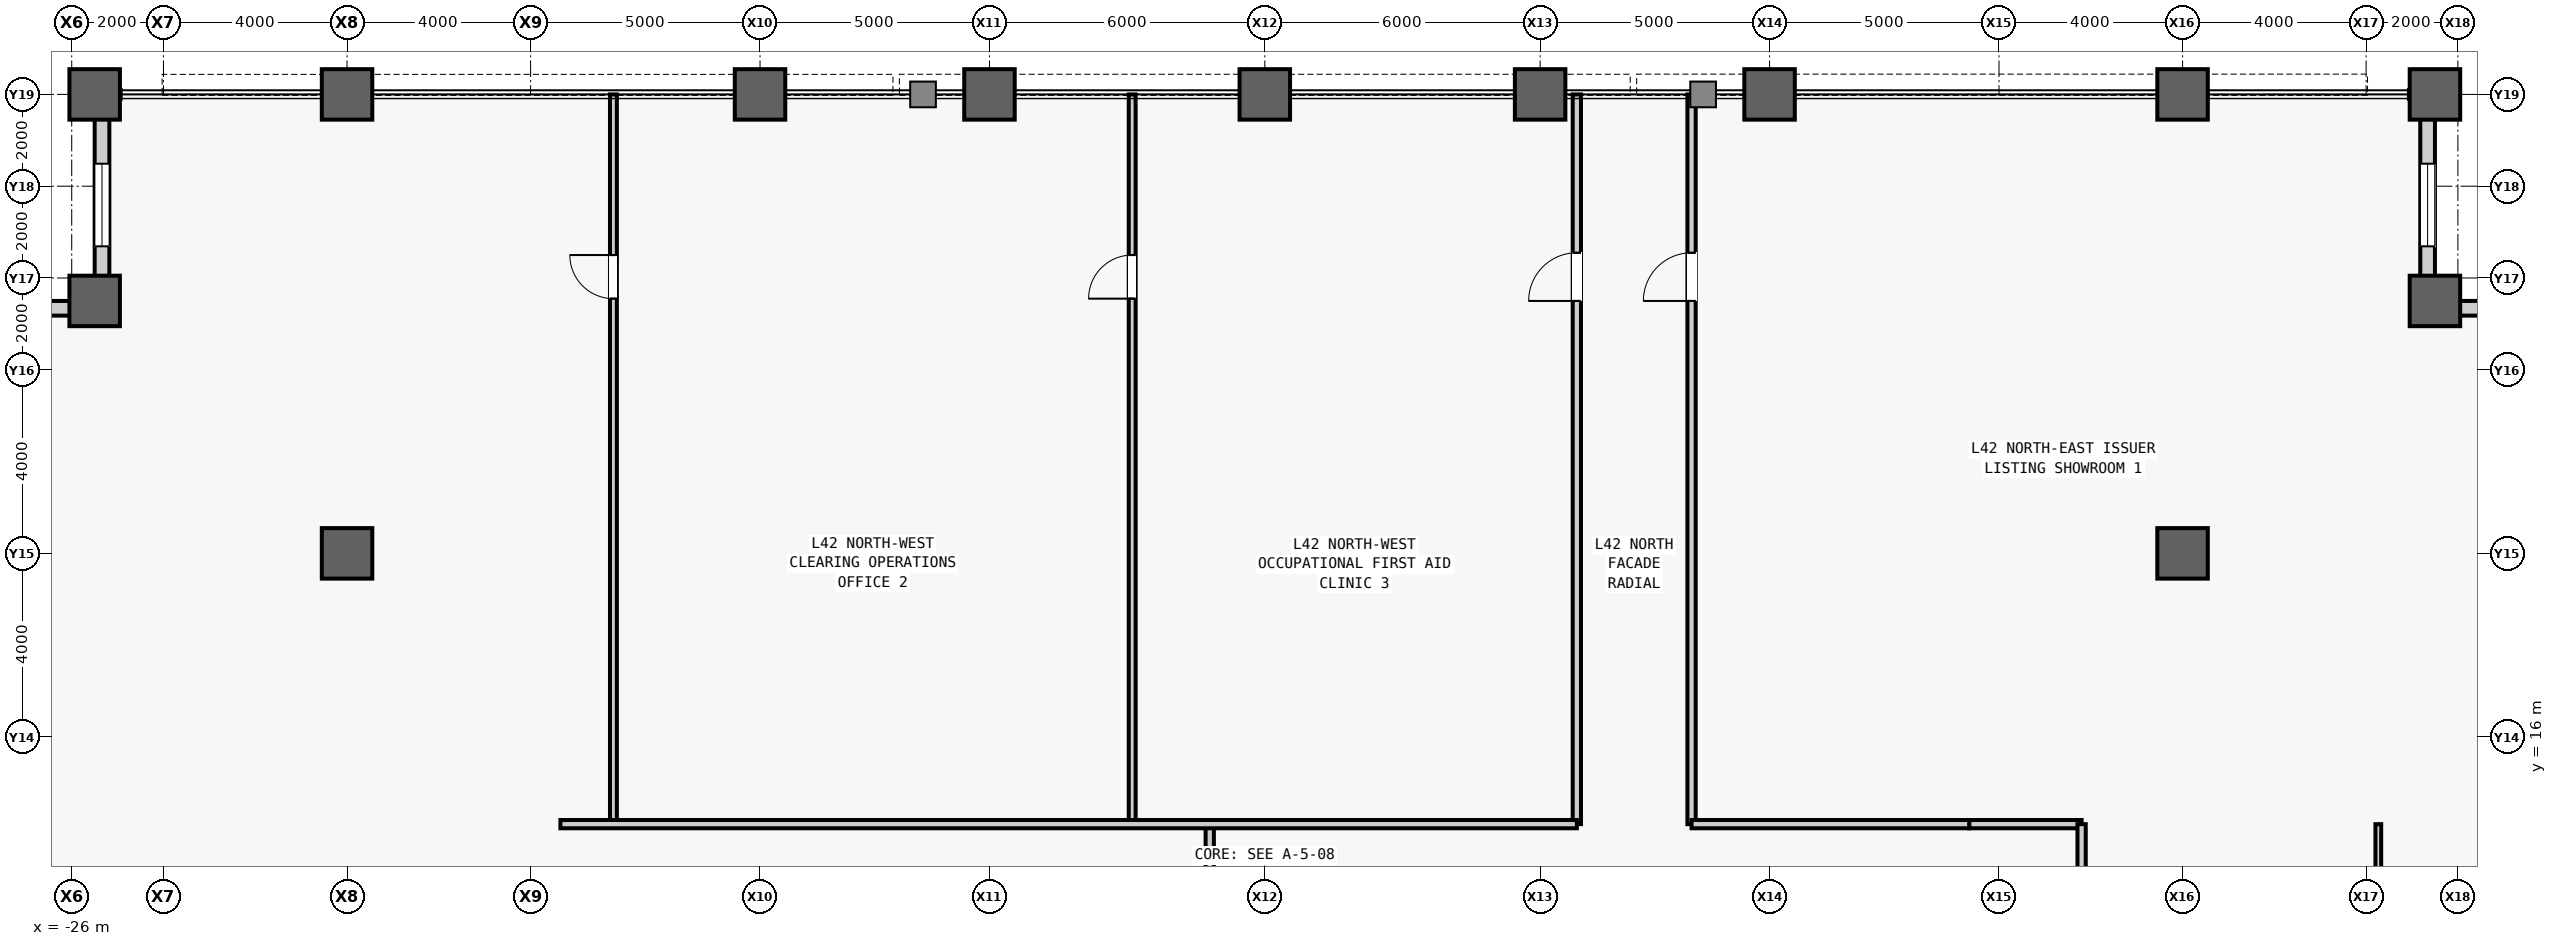
"""IFC4 building model, lengths in metres.
Left out: names, types, materials, properties, quantities, classifications, styles, units other than length and angle.
Written with IfcOpenShell. Run it as: python <this file> out.ifc"""

import sys

from ifc_helpers import new_model, si_unit, direction, frame, frame_2d, origin, origin_2d, place, context, subcontext, project, spatial, rectangle, hollow_rectangle, extrude, source, transform, mapped, element, fill, save


model = new_model("IFC4")
c1 = context("Model", 3, precision=1e-05, world=origin(), true_north=direction((0.0, 1.0)))
c2 = subcontext(c1, "Body", "Model", "MODEL_VIEW")
j1 = project(units=[si_unit("LENGTHUNIT", "METRE"), si_unit("PLANEANGLEUNIT", "RADIAN")], contexts=[c1])
p1 = place(None, origin())
s1 = spatial("IfcSite", under=j1, at=p1, CompositionType="ELEMENT")
p2 = place(p1, origin())
s2 = spatial("IfcBuilding", under=s1, at=p2, CompositionType="ELEMENT")
p3 = place(p2, frame((0.0, 0.0, 183.1)))
s3 = spatial("IfcBuildingStorey", under=s2, at=p3, CompositionType="ELEMENT", Elevation=183.1)
m1 = source(origin(), c2, "Body", "SweptSolid", [
    extrude(hollow_rectangle(XDim=1.1, YDim=1.1, WallThickness=0.06, at=origin_2d()), origin(), (0.0, 0.0, 1.0), 4.0),
])
for number, where, z_axis, x_axis in (
    (1, (-25.5, 25.5, 0.0), (0.0, 0.0, 1.0), (1.0, 0.0, 0.0)),
    (2, (-25.5, 30.0, 0.0), (0.0, 0.0, 1.0), (1.0, 0.0, 0.0)),
    (3, (-20.0, 20.0, 0.0), (0.0, 0.0, 1.0), (1.0, 0.0, 0.0)),
    (4, (-20.0, 30.0, 0.0), (0.0, 0.0, 1.0), (1.0, 0.0, 0.0)),
    (5, (-11.0, 30.0, 0.0), (0.0, 0.0, 1.0), (1.0, 0.0, 0.0)),
    (6, (-6.0, 30.0, 0.0), (0.0, 0.0, 1.0), (1.0, 0.0, 0.0)),
    (7, (0.0, 30.0, 0.0), (0.0, 0.0, 1.0), (1.0, 0.0, 0.0)),
    (8, (6.0, 30.0, 0.0), (0.0, 0.0, 1.0), (1.0, 0.0, 0.0)),
    (9, (11.0, 30.0, 0.0), (0.0, 0.0, 1.0), (1.0, 0.0, 0.0)),
    (10, (20.0, 20.0, 0.0), (0.0, 0.0, 1.0), (1.0, 0.0, 0.0)),
    (11, (20.0, 30.0, 0.0), (0.0, 0.0, 1.0), (1.0, 0.0, 0.0)),
    (12, (25.5, 25.5, 0.0), (0.0, 0.0, 1.0), (1.0, 0.0, 0.0)),
    (13, (25.5, 30.0, 0.0), (0.0, 0.0, 1.0), (1.0, 0.0, 0.0)),
):
    element("IfcColumn", number, at=place(p3, frame(where, z_axis=z_axis, x_axis=x_axis)), inside=s3, PredefinedType="COLUMN", context=c2, shape_type="MappedRepresentation", body=[
        mapped(m1, transform((0.0, 0.0, 0.0), scale=1.0)),
    ])
m2 = source(origin(), c2, "Body", "SweptSolid", [
    extrude(rectangle(XDim=4.18, YDim=0.32, at=frame_2d((2.09, 0.0))), origin(), (0.0, 0.0, 1.0), 3.164),
])
p4 = place(p3, frame((25.5, 25.34, 0.0), z_axis=(0.0, 0.0, 1.0), x_axis=(1.0, 0.0, 0.0)))
e14 = element("IfcWall", 14, at=p4, inside=s3, PredefinedType="STANDARD", context=c2, shape_type="MappedRepresentation", body=[
    mapped(m2, transform((0.0, 0.0, 0.0), scale=1.0)),
])
m3 = source(origin(), c2, "Body", "SweptSolid", [
    extrude(rectangle(XDim=1.8, YDim=2.4, at=frame_2d((0.9, 1.2))), frame((0.0, 0.17, 0.0), z_axis=(0.0, -1.0, 0.0), x_axis=(1.0, 0.0, 0.0)), (0.0, 0.0, 1.0), 0.34),
])
p5 = place(p4, frame((1.19, 0.0, 0.5)))
e15 = element("IfcOpeningElement", 15, at=p5, cuts=e14, PredefinedType="OPENING", context=c2, shape_type="MappedRepresentation", body=[
    mapped(m3, transform((0.0, 0.0, 0.0), scale=1.0)),
])
p6 = place(p3, frame((25.34, 25.5, 0.0), z_axis=(0.0, 0.0, 1.0), x_axis=(0.0, 1.0, 0.0)))
e16 = element("IfcWall", 16, at=p6, inside=s3, PredefinedType="STANDARD", context=c2, shape_type="MappedRepresentation", body=[
    mapped(m2, transform((0.0, 0.0, 0.0), scale=1.0)),
])
p7 = place(p6, frame((1.19, 0.0, 0.5)))
e17 = element("IfcOpeningElement", 17, at=p7, cuts=e16, PredefinedType="OPENING", context=c2, shape_type="MappedRepresentation", body=[
    mapped(m3, transform((0.0, 0.0, 0.0), scale=1.0)),
])
p8 = place(p3, frame((-25.34, 25.5, 0.0), z_axis=(0.0, 0.0, 1.0), x_axis=(0.0, 1.0, 0.0)))
e18 = element("IfcWall", 18, at=p8, inside=s3, PredefinedType="STANDARD", context=c2, shape_type="MappedRepresentation", body=[
    mapped(m2, transform((0.0, 0.0, 0.0), scale=1.0)),
])
p9 = place(p8, frame((1.19, 0.0, 0.5)))
e19 = element("IfcOpeningElement", 19, at=p9, cuts=e18, PredefinedType="OPENING", context=c2, shape_type="MappedRepresentation", body=[
    mapped(m3, transform((0.0, 0.0, 0.0), scale=1.0)),
])
p10 = place(p3, frame((-25.5, 25.34, 0.0), z_axis=(0.0, 0.0, 1.0), x_axis=(-1.0, 0.0, 0.0)))
e20 = element("IfcWall", 20, at=p10, inside=s3, PredefinedType="STANDARD", context=c2, shape_type="MappedRepresentation", body=[
    mapped(m2, transform((0.0, 0.0, 0.0), scale=1.0)),
])
p11 = place(p10, frame((1.19, 0.0, 0.5)))
e21 = element("IfcOpeningElement", 21, at=p11, cuts=e20, PredefinedType="OPENING", context=c2, shape_type="MappedRepresentation", body=[
    mapped(m3, transform((0.0, 0.0, 0.0), scale=1.0)),
])
m4 = source(origin(), c2, "Body", "SweptSolid", [
    extrude(rectangle(XDim=2.45, YDim=0.18, at=frame_2d((1.225, 0.0))), origin(), (0.0, 0.0, 1.0), 3.78),
])
p12 = place(p3, frame((15.35, 14.1, 0.0), z_axis=(0.0, 0.0, 1.0), x_axis=(1.0, 0.0, 0.0)))
e22 = element("IfcWall", 22, at=p12, inside=s3, PredefinedType="PARTITIONING", context=c2, shape_type="MappedRepresentation", body=[
    mapped(m4, transform((0.0, 0.0, 0.0), scale=1.0)),
])
m5 = source(origin(), c2, "Body", "SweptSolid", [
    extrude(rectangle(XDim=3.1, YDim=0.18, at=frame_2d((1.55, 0.0))), origin(), (0.0, 0.0, 1.0), 3.78),
])
p13 = place(p3, frame((-1.2, 11.0, 0.0), z_axis=(0.0, 0.0, 1.0), x_axis=(0.0, 1.0, 0.0)))
e23 = element("IfcWall", 23, at=p13, inside=s3, PredefinedType="PARTITIONING", context=c2, shape_type="MappedRepresentation", body=[
    mapped(m5, transform((0.0, 0.0, 0.0), scale=1.0)),
])
m6 = source(origin(), c2, "Body", "SweptSolid", [
    extrude(rectangle(XDim=15.9, YDim=0.15, at=frame_2d((7.95, 0.0))), origin(), (0.0, 0.0, 1.0), 3.78),
])
p14 = place(p3, frame((-14.195, 14.1, 0.0), z_axis=(0.0, 0.0, 1.0), x_axis=(0.0, 1.0, 0.0)))
e24 = element("IfcWall", 24, at=p14, inside=s3, PredefinedType="PARTITIONING", context=c2, shape_type="MappedRepresentation", body=[
    mapped(m6, transform((0.0, 0.0, 0.0), scale=1.0)),
])
m7 = source(origin(), c2, "Body", "SweptSolid", [
    extrude(rectangle(XDim=0.95, YDim=2.15, at=frame_2d((0.475, 1.075))), frame((0.0, 0.085, 0.0), z_axis=(0.0, -1.0, 0.0), x_axis=(1.0, 0.0, 0.0)), (0.0, 0.0, 1.0), 0.17),
])
p15 = place(p14, frame((11.45, 0.0, 0.0)))
e25 = element("IfcOpeningElement", 25, at=p15, cuts=e24, PredefinedType="OPENING", context=c2, shape_type="MappedRepresentation", body=[
    mapped(m7, transform((0.0, 0.0, 0.0), scale=1.0)),
])
p16 = place(p3, frame((-2.89, 14.1, 0.0), z_axis=(0.0, 0.0, 1.0), x_axis=(0.0, 1.0, 0.0)))
e26 = element("IfcWall", 26, at=p16, inside=s3, PredefinedType="PARTITIONING", context=c2, shape_type="MappedRepresentation", body=[
    mapped(m6, transform((0.0, 0.0, 0.0), scale=1.0)),
])
p17 = place(p16, frame((11.45, 0.0, 0.0)))
e27 = element("IfcOpeningElement", 27, at=p17, cuts=e26, PredefinedType="OPENING", context=c2, shape_type="MappedRepresentation", body=[
    mapped(m7, transform((0.0, 0.0, 0.0), scale=1.0)),
])
m8 = source(origin(), c2, "Body", "SweptSolid", [
    extrude(rectangle(XDim=15.9, YDim=0.18, at=frame_2d((7.95, 0.0))), origin(), (0.0, 0.0, 1.0), 3.78),
])
p18 = place(p3, frame((6.8, 14.1, 0.0), z_axis=(0.0, 0.0, 1.0), x_axis=(0.0, 1.0, 0.0)))
e28 = element("IfcWall", 28, at=p18, inside=s3, PredefinedType="PARTITIONING", context=c2, shape_type="MappedRepresentation", body=[
    mapped(m8, transform((0.0, 0.0, 0.0), scale=1.0)),
])
m9 = source(origin(), c2, "Body", "SweptSolid", [
    extrude(rectangle(XDim=1.05, YDim=2.2, at=frame_2d((0.525, 1.1))), frame((0.0, 0.1, 0.0), z_axis=(0.0, -1.0, 0.0), x_axis=(1.0, 0.0, 0.0)), (0.0, 0.0, 1.0), 0.2),
])
p19 = place(p18, frame((11.4, 0.0, 0.0)))
e29 = element("IfcOpeningElement", 29, at=p19, cuts=e28, PredefinedType="OPENING", context=c2, shape_type="MappedRepresentation", body=[
    mapped(m9, transform((0.0, 0.0, 0.0), scale=1.0)),
])
m10 = source(origin(), c2, "Body", "SweptSolid", [
    extrude(rectangle(XDim=22.15, YDim=0.18, at=frame_2d((11.075, 0.0))), origin(), (0.0, 0.0, 1.0), 3.78),
])
p20 = place(p3, frame((-15.35, 14.1, 0.0), z_axis=(0.0, 0.0, 1.0), x_axis=(1.0, 0.0, 0.0)))
e30 = element("IfcWall", 30, at=p20, inside=s3, PredefinedType="PARTITIONING", context=c2, shape_type="MappedRepresentation", body=[
    mapped(m10, transform((0.0, 0.0, 0.0), scale=1.0)),
])
p21 = place(p3, frame((9.3, 14.1, 0.0), z_axis=(0.0, 0.0, 1.0), x_axis=(0.0, 1.0, 0.0)))
e31 = element("IfcWall", 31, at=p21, inside=s3, PredefinedType="PARTITIONING", context=c2, shape_type="MappedRepresentation", body=[
    mapped(m8, transform((0.0, 0.0, 0.0), scale=1.0)),
])
p22 = place(p21, frame((11.4, 0.0, 0.0)))
e32 = element("IfcOpeningElement", 32, at=p22, cuts=e31, PredefinedType="OPENING", context=c2, shape_type="MappedRepresentation", body=[
    mapped(m9, transform((0.0, 0.0, 0.0), scale=1.0)),
])
m11 = source(origin(), c2, "Body", "SweptSolid", [
    extrude(rectangle(XDim=6.05, YDim=0.18, at=frame_2d((3.025, 0.0))), origin(), (0.0, 0.0, 1.0), 3.78),
])
p23 = place(p3, frame((9.3, 14.1, 0.0), z_axis=(0.0, 0.0, 1.0), x_axis=(1.0, 0.0, 0.0)))
e33 = element("IfcWall", 33, at=p23, inside=s3, PredefinedType="PARTITIONING", context=c2, shape_type="MappedRepresentation", body=[
    mapped(m11, transform((0.0, 0.0, 0.0), scale=1.0)),
])
m12 = source(origin(), c2, "Body", "SweptSolid", [
    extrude(rectangle(XDim=7.9, YDim=0.125, at=frame_2d((3.95, 0.0))), origin(), (0.0, 0.0, 1.0), 3.78),
])
p24 = place(p3, frame((24.266, 6.2, 0.0), z_axis=(0.0, 0.0, 1.0), x_axis=(0.0, 1.0, 0.0)))
e34 = element("IfcWall", 34, at=p24, inside=s3, PredefinedType="PARTITIONING", context=c2, shape_type="MappedRepresentation", body=[
    mapped(m12, transform((0.0, 0.0, 0.0), scale=1.0)),
])
m13 = source(origin(), c2, "Body", "SweptSolid", [
    extrude(rectangle(XDim=7.9, YDim=0.18, at=frame_2d((3.95, 0.0))), origin(), (0.0, 0.0, 1.0), 3.78),
])
p25 = place(p3, frame((17.8, 6.2, 0.0), z_axis=(0.0, 0.0, 1.0), x_axis=(0.0, 1.0, 0.0)))
e35 = element("IfcWall", 35, at=p25, inside=s3, PredefinedType="PARTITIONING", context=c2, shape_type="MappedRepresentation", body=[
    mapped(m13, transform((0.0, 0.0, 0.0), scale=1.0)),
])
m14 = source(origin(), c2, "Body", "SweptSolid", [
    extrude(rectangle(XDim=1.8, YDim=2.4, at=frame_2d((0.9, 1.2))), frame((0.0, 0.03, 0.0), z_axis=(0.0, -1.0, 0.0), x_axis=(1.0, 0.0, 0.0)), (0.0, 0.0, 1.0), 0.06),
])
p26 = place(p7, origin())
e36 = element("IfcWindow", 36, at=p26, inside=s3, PartitioningType="SINGLE_PANEL", PredefinedType="WINDOW", context=c2, shape_type="MappedRepresentation", body=[
    mapped(m14, transform((0.0, 0.0, 0.0), scale=1.0)),
])
fill(e17, e36)
p27 = place(p9, origin())
e37 = element("IfcWindow", 37, at=p27, inside=s3, PartitioningType="SINGLE_PANEL", PredefinedType="WINDOW", context=c2, shape_type="MappedRepresentation", body=[
    mapped(m14, transform((0.0, 0.0, 0.0), scale=1.0)),
])
fill(e19, e37)
m15 = source(origin(), c2, "Body", "SweptSolid", [
    extrude(rectangle(XDim=0.95, YDim=2.15, at=frame_2d((0.475, 1.075))), frame((0.0, 0.025, 0.0), z_axis=(0.0, -1.0, 0.0), x_axis=(1.0, 0.0, 0.0)), (0.0, 0.0, 1.0), 0.05),
])
p28 = place(p15, origin())
e38 = element("IfcDoor", 38, at=p28, inside=s3, OperationType="SINGLE_SWING_RIGHT", PredefinedType="DOOR", context=c2, shape_type="MappedRepresentation", body=[
    mapped(m15, transform((0.0, 0.0, 0.0), scale=1.0)),
])
fill(e25, e38)
p29 = place(p17, origin())
e39 = element("IfcDoor", 39, at=p29, inside=s3, OperationType="SINGLE_SWING_LEFT", PredefinedType="DOOR", context=c2, shape_type="MappedRepresentation", body=[
    mapped(m15, transform((0.0, 0.0, 0.0), scale=1.0)),
])
fill(e27, e39)
m16 = source(origin(), c2, "Body", "SweptSolid", [
    extrude(rectangle(XDim=1.05, YDim=2.2, at=frame_2d((0.525, 1.1))), frame((0.0, 0.025, 0.0), z_axis=(0.0, -1.0, 0.0), x_axis=(1.0, 0.0, 0.0)), (0.0, 0.0, 1.0), 0.05),
])
p30 = place(p19, origin())
e40 = element("IfcDoor", 40, at=p30, inside=s3, OperationType="SINGLE_SWING_LEFT", PredefinedType="DOOR", context=c2, shape_type="MappedRepresentation", body=[
    mapped(m16, transform((0.0, 0.0, 0.0), scale=1.0)),
])
fill(e29, e40)
p31 = place(p22, origin())
e41 = element("IfcDoor", 41, at=p31, inside=s3, OperationType="SINGLE_SWING_LEFT", PredefinedType="DOOR", context=c2, shape_type="MappedRepresentation", body=[
    mapped(m16, transform((0.0, 0.0, 0.0), scale=1.0)),
])
fill(e32, e41)
save(model, sys.argv[1])
